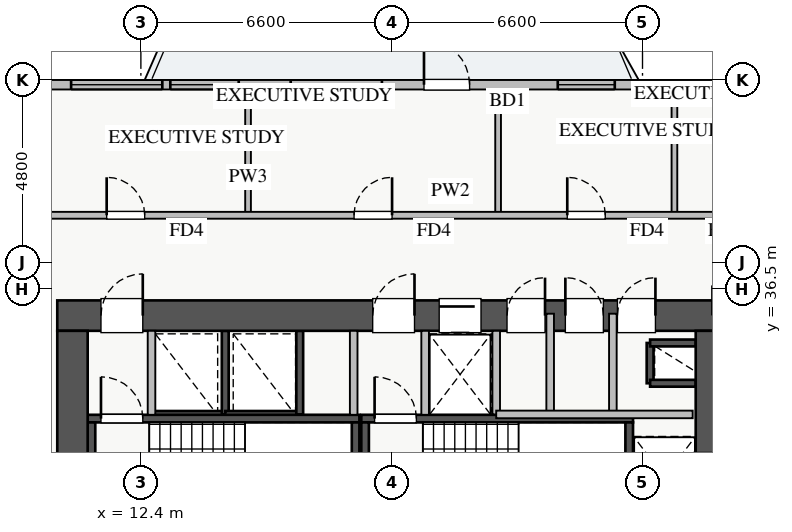
"""IFC4 building model, lengths in metres.
Left out: names, types, materials, properties, quantities, classifications, styles, units other than length and angle.
Written with IfcOpenShell. Run it as: python <this file> out.ifc"""

import sys

from ifc_helpers import new_model, si_unit, direction, frame, frame_2d, origin, place, context, subcontext, project, spatial, rectangle, extrude, source, transform, mapped, element, fill, save


model = new_model("IFC4")
c1 = context("Model", 3, precision=1e-05, world=origin(), true_north=direction((0.0, 1.0)))
c2 = subcontext(c1, "Body", "Model", "MODEL_VIEW")
j1 = project(units=[si_unit("LENGTHUNIT", "METRE"), si_unit("PLANEANGLEUNIT", "RADIAN")], contexts=[c1])
p1 = place(None, origin())
s1 = spatial("IfcSite", under=j1, at=p1, CompositionType="ELEMENT")
p2 = place(p1, origin())
s2 = spatial("IfcBuilding", under=s1, at=p2, CompositionType="ELEMENT")
p3 = place(p2, frame((0.0, 0.0, 69.75)))
s3 = spatial("IfcBuildingStorey", under=s2, at=p3, CompositionType="ELEMENT", Elevation=69.75)
p4 = place(p3, frame((12.68, 33.2, 0.0), z_axis=(0.0, 0.0, 1.0), x_axis=(1.0, 0.0, 0.0)))
e1 = element("IfcWall", 1, at=p4, inside=s3, PredefinedType="SHEAR", context=c2, shape_type="SweptSolid", body=[
    extrude(rectangle(XDim=1.94, YDim=0.18, at=frame_2d((0.97, 0.0))), origin(), (0.0, 0.0, 1.0), 3.07),
])
p5 = place(p3, frame((14.62, 33.2, 0.0), z_axis=(0.0, 0.0, 1.0), x_axis=(0.0, 1.0, 0.0)))
e2 = element("IfcWall", 2, at=p5, inside=s3, PredefinedType="SHEAR", context=c2, shape_type="SweptSolid", body=[
    extrude(rectangle(XDim=2.2, YDim=0.18, at=frame_2d((1.1, 0.0))), origin(), (0.0, 0.0, 1.0), 3.07),
])
p6 = place(p3, frame((25.8, 34.02, 0.0), z_axis=(0.0, 0.0, 1.0), x_axis=(0.0, 1.0, 0.0)))
e3 = element("IfcWall", 3, at=p6, inside=s3, PredefinedType="SHEAR", context=c2, shape_type="SweptSolid", body=[
    extrude(rectangle(XDim=1.06, YDim=0.18, at=frame_2d((0.53, 0.0))), origin(), (0.0, 0.0, 1.0), 3.07),
])
for number, where, z_axis, x_axis in (
    (4, (25.8, 35.08, 0.0), (0.0, 0.0, 1.0), (1.0, 0.0, 0.0)),
    (5, (25.8, 34.02, 0.0), (0.0, 0.0, 1.0), (1.0, 0.0, 0.0)),
):
    element("IfcWall", number, at=place(p3, frame(where, z_axis=z_axis, x_axis=x_axis)), inside=s3, PredefinedType="SHEAR", context=c2, shape_type="SweptSolid", body=[
        extrude(rectangle(XDim=1.2, YDim=0.18, at=frame_2d((0.6, 0.0))), origin(), (0.0, 0.0, 1.0), 3.07),
    ])
p7 = place(p3, frame((14.62, 33.2, 0.0), z_axis=(0.0, 0.0, 1.0), x_axis=(1.0, 0.0, 0.0)))
e6 = element("IfcWall", 6, at=p7, inside=s3, PredefinedType="SHEAR", context=c2, shape_type="SweptSolid", body=[
    extrude(rectangle(XDim=1.96, YDim=0.18, at=frame_2d((0.98, 0.0))), origin(), (0.0, 0.0, 1.0), 3.07),
])
p8 = place(p3, frame((16.58, 33.2, 0.0), z_axis=(0.0, 0.0, 1.0), x_axis=(0.0, 1.0, 0.0)))
e7 = element("IfcWall", 7, at=p8, inside=s3, PredefinedType="SHEAR", context=c2, shape_type="SweptSolid", body=[
    extrude(rectangle(XDim=2.2, YDim=0.18, at=frame_2d((1.1, 0.0))), origin(), (0.0, 0.0, 1.0), 3.07),
])
p9 = place(p3, frame((19.88, 33.2, 0.0), z_axis=(0.0, 0.0, 1.0), x_axis=(1.0, 0.0, 0.0)))
e8 = element("IfcWall", 8, at=p9, inside=s3, PredefinedType="SHEAR", context=c2, shape_type="SweptSolid", body=[
    extrude(rectangle(XDim=1.87, YDim=0.18, at=frame_2d((0.935, 0.0))), origin(), (0.0, 0.0, 1.0), 3.07),
])
p10 = place(p3, frame((11.0, 33.09, 0.0), z_axis=(0.0, 0.0, 1.0), x_axis=(1.0, 0.0, 0.0)))
e9 = element("IfcWall", 9, at=p10, inside=s3, PredefinedType="SHEAR", context=c2, shape_type="SweptSolid", body=[
    extrude(rectangle(XDim=7.15, YDim=0.2, at=frame_2d((3.575, 0.0))), origin(), (0.0, 0.0, 1.0), 3.25),
])
p11 = place(p10, frame((0.35, 0.0, 0.0)))
e10 = element("IfcOpeningElement", 10, at=p11, cuts=e9, PredefinedType="OPENING", context=c2, shape_type="SweptSolid", body=[
    extrude(rectangle(XDim=1.1, YDim=2.05, at=frame_2d((0.55, 1.025))), frame((0.0, 0.11, 0.0), z_axis=(0.0, -1.0, 0.0), x_axis=(1.0, 0.0, 0.0)), (0.0, 0.0, 1.0), 0.22),
])
for number, where, z_axis, x_axis in (
    (11, (11.1, 30.05, 0.0), (0.0, 0.0, 1.0), (0.0, 1.0, 0.0)),
    (12, (18.05, 30.05, 0.0), (0.0, 0.0, 1.0), (0.0, 1.0, 0.0)),
):
    element("IfcWall", number, at=place(p3, frame(where, z_axis=z_axis, x_axis=x_axis)), inside=s3, PredefinedType="SHEAR", context=c2, shape_type="SweptSolid", body=[
        extrude(rectangle(XDim=2.94, YDim=0.2, at=frame_2d((1.47, 0.0))), origin(), (0.0, 0.0, 1.0), 3.25),
    ])
p12 = place(p3, frame((18.2, 33.09, 0.0), z_axis=(0.0, 0.0, 1.0), x_axis=(1.0, 0.0, 0.0)))
e13 = element("IfcWall", 13, at=p12, inside=s3, PredefinedType="SHEAR", context=c2, shape_type="SweptSolid", body=[
    extrude(rectangle(XDim=7.15, YDim=0.2, at=frame_2d((3.575, 0.0))), origin(), (0.0, 0.0, 1.0), 3.25),
])
p13 = place(p12, frame((0.35, 0.0, 0.0)))
e14 = element("IfcOpeningElement", 14, at=p13, cuts=e13, PredefinedType="OPENING", context=c2, shape_type="SweptSolid", body=[
    extrude(rectangle(XDim=1.1, YDim=2.05, at=frame_2d((0.55, 1.025))), frame((0.0, 0.11, 0.0), z_axis=(0.0, -1.0, 0.0), x_axis=(1.0, 0.0, 0.0)), (0.0, 0.0, 1.0), 0.22),
])
for number, where, z_axis, x_axis in (
    (15, (18.3, 30.05, 0.0), (0.0, 0.0, 1.0), (0.0, 1.0, 0.0)),
    (16, (25.25, 30.05, 0.0), (0.0, 0.0, 1.0), (0.0, 1.0, 0.0)),
):
    element("IfcWall", number, at=place(p3, frame(where, z_axis=z_axis, x_axis=x_axis)), inside=s3, PredefinedType="SHEAR", context=c2, shape_type="SweptSolid", body=[
        extrude(rectangle(XDim=2.94, YDim=0.2, at=frame_2d((1.47, 0.0))), origin(), (0.0, 0.0, 1.0), 3.25),
    ])
p14 = place(p3, frame((10.2, 35.8, 0.0), z_axis=(0.0, 0.0, 1.0), x_axis=(1.0, 0.0, 0.0)))
e17 = element("IfcWall", 17, at=p14, inside=s3, PredefinedType="SHEAR", context=c2, shape_type="SweptSolid", body=[
    extrude(rectangle(XDim=17.6, YDim=0.8, at=frame_2d((8.8, 0.0))), origin(), (0.0, 0.0, 1.0), 3.25),
])
p15 = place(p14, frame((1.15, 0.0, 0.0)))
e18 = element("IfcOpeningElement", 18, at=p15, cuts=e17, PredefinedType="OPENING", context=c2, shape_type="SweptSolid", body=[
    extrude(rectangle(XDim=1.1, YDim=2.05, at=frame_2d((0.55, 1.025))), frame((0.0, 0.41, 0.0), z_axis=(0.0, -1.0, 0.0), x_axis=(1.0, 0.0, 0.0)), (0.0, 0.0, 1.0), 0.82),
])
p16 = place(p14, frame((8.3, 0.0, 0.0)))
e19 = element("IfcOpeningElement", 19, at=p16, cuts=e17, PredefinedType="OPENING", context=c2, shape_type="SweptSolid", body=[
    extrude(rectangle(XDim=1.1, YDim=2.05, at=frame_2d((0.55, 1.025))), frame((0.0, 0.41, 0.0), z_axis=(0.0, -1.0, 0.0), x_axis=(1.0, 0.0, 0.0)), (0.0, 0.0, 1.0), 0.82),
])
p17 = place(p14, frame((10.05, 0.0, 0.0)))
e20 = element("IfcOpeningElement", 20, at=p17, cuts=e17, PredefinedType="OPENING", context=c2, shape_type="SweptSolid", body=[
    extrude(rectangle(XDim=1.1, YDim=2.05, at=frame_2d((0.55, 1.025))), frame((0.0, 0.41, 0.0), z_axis=(0.0, -1.0, 0.0), x_axis=(1.0, 0.0, 0.0)), (0.0, 0.0, 1.0), 0.82),
])
p18 = place(p14, frame((14.74, 0.0, 0.0)))
e21 = element("IfcOpeningElement", 21, at=p18, cuts=e17, PredefinedType="OPENING", context=c2, shape_type="SweptSolid", body=[
    extrude(rectangle(XDim=1.0, YDim=2.05, at=frame_2d((0.5, 1.025))), frame((0.0, 0.41, 0.0), z_axis=(0.0, -1.0, 0.0), x_axis=(1.0, 0.0, 0.0)), (0.0, 0.0, 1.0), 0.82),
])
p19 = place(p14, frame((11.835, 0.0, 0.0)))
e22 = element("IfcOpeningElement", 22, at=p19, cuts=e17, PredefinedType="OPENING", context=c2, shape_type="SweptSolid", body=[
    extrude(rectangle(XDim=1.0, YDim=2.05, at=frame_2d((0.5, 1.025))), frame((0.0, 0.41, 0.0), z_axis=(0.0, -1.0, 0.0), x_axis=(1.0, 0.0, 0.0)), (0.0, 0.0, 1.0), 0.82),
])
p20 = place(p14, frame((13.37, 0.0, 0.0)))
e23 = element("IfcOpeningElement", 23, at=p20, cuts=e17, PredefinedType="OPENING", context=c2, shape_type="SweptSolid", body=[
    extrude(rectangle(XDim=1.0, YDim=2.05, at=frame_2d((0.5, 1.025))), frame((0.0, 0.41, 0.0), z_axis=(0.0, -1.0, 0.0), x_axis=(1.0, 0.0, 0.0)), (0.0, 0.0, 1.0), 0.82),
])
p21 = place(p3, frame((10.6, 29.8, 0.0), z_axis=(0.0, 0.0, 1.0), x_axis=(0.0, 1.0, 0.0)))
e24 = element("IfcWall", 24, at=p21, inside=s3, PredefinedType="SHEAR", context=c2, shape_type="SweptSolid", body=[
    extrude(rectangle(XDim=5.6, YDim=0.8, at=frame_2d((2.8, 0.0))), origin(), (0.0, 0.0, 1.0), 3.25),
])
p22 = place(p3, frame((27.4, 29.8, 0.0), z_axis=(0.0, 0.0, 1.0), x_axis=(0.0, 1.0, 0.0)))
e25 = element("IfcWall", 25, at=p22, inside=s3, PredefinedType="SHEAR", context=c2, shape_type="SweptSolid", body=[
    extrude(rectangle(XDim=5.6, YDim=0.8, at=frame_2d((2.8, 0.0))), origin(), (0.0, 0.0, 1.0), 3.25),
])
p23 = place(p22, frame((1.1, 0.0, 0.0)))
e26 = element("IfcOpeningElement", 26, at=p23, cuts=e25, PredefinedType="OPENING", context=c2, shape_type="SweptSolid", body=[
    extrude(rectangle(XDim=1.3, YDim=2.05, at=frame_2d((0.65, 1.025))), frame((0.0, 0.41, 0.0), z_axis=(0.0, -1.0, 0.0), x_axis=(1.0, 0.0, 0.0)), (0.0, 0.0, 1.0), 0.82),
])
p24 = place(p3, frame((5.45, 41.875, 0.0), z_axis=(0.0, 0.0, 1.0), x_axis=(1.0, 0.0, 0.0)))
e27 = element("IfcWall", 27, at=p24, inside=s3, PredefinedType="STANDARD", context=c2, shape_type="SweptSolid", body=[
    extrude(rectangle(XDim=27.1, YDim=0.25, at=frame_2d((13.55, 0.0))), origin(), (0.0, 0.0, 1.0), 2.61),
])
p25 = place(p24, frame((14.4, 0.0, 0.0)))
e28 = element("IfcOpeningElement", 28, at=p25, cuts=e27, PredefinedType="OPENING", context=c2, shape_type="SweptSolid", body=[
    extrude(rectangle(XDim=1.2, YDim=2.1, at=frame_2d((0.6, 1.05))), frame((0.0, 0.135, 0.0), z_axis=(0.0, -1.0, 0.0), x_axis=(1.0, 0.0, 0.0)), (0.0, 0.0, 1.0), 0.27),
])
p26 = place(p24, frame((1.48, 0.0, 0.9)))
e29 = element("IfcOpeningElement", 29, at=p26, cuts=e27, PredefinedType="OPENING", context=c2, shape_type="SweptSolid", body=[
    extrude(rectangle(XDim=1.5, YDim=1.5, at=frame_2d((0.75, 0.75))), frame((0.0, 0.135, 0.0), z_axis=(0.0, -1.0, 0.0), x_axis=(1.0, 0.0, 0.0)), (0.0, 0.0, 1.0), 0.27),
])
p27 = place(p24, frame((7.725, 0.0, 0.9)))
e30 = element("IfcOpeningElement", 30, at=p27, cuts=e27, PredefinedType="OPENING", context=c2, shape_type="SweptSolid", body=[
    extrude(rectangle(XDim=1.8, YDim=1.5, at=frame_2d((0.9, 0.75))), frame((0.0, 0.135, 0.0), z_axis=(0.0, -1.0, 0.0), x_axis=(1.0, 0.0, 0.0)), (0.0, 0.0, 1.0), 0.27),
])
p28 = place(p24, frame((17.92, 0.0, 0.9)))
e31 = element("IfcOpeningElement", 31, at=p28, cuts=e27, PredefinedType="OPENING", context=c2, shape_type="SweptSolid", body=[
    extrude(rectangle(XDim=1.5, YDim=1.5, at=frame_2d((0.75, 0.75))), frame((0.0, 0.135, 0.0), z_axis=(0.0, -1.0, 0.0), x_axis=(1.0, 0.0, 0.0)), (0.0, 0.0, 1.0), 0.27),
])
p29 = place(p24, frame((22.663, 0.0, 0.9)))
e32 = element("IfcOpeningElement", 32, at=p29, cuts=e27, PredefinedType="OPENING", context=c2, shape_type="SweptSolid", body=[
    extrude(rectangle(XDim=2.1, YDim=1.48, at=frame_2d((1.05, 0.74))), frame((0.0, 0.135, 0.0), z_axis=(0.0, -1.0, 0.0), x_axis=(1.0, 0.0, 0.0)), (0.0, 0.0, 1.0), 0.27),
])
p30 = place(p24, frame((5.114, 0.0, 0.9)))
e33 = element("IfcOpeningElement", 33, at=p30, cuts=e27, PredefinedType="OPENING", context=c2, shape_type="SweptSolid", body=[
    extrude(rectangle(XDim=2.4, YDim=1.5, at=frame_2d((1.2, 0.75))), frame((0.0, 0.135, 0.0), z_axis=(0.0, -1.0, 0.0), x_axis=(1.0, 0.0, 0.0)), (0.0, 0.0, 1.0), 0.27),
])
p31 = place(p24, frame((10.893, 0.0, 0.9)))
e34 = element("IfcOpeningElement", 34, at=p31, cuts=e27, PredefinedType="OPENING", context=c2, shape_type="SweptSolid", body=[
    extrude(rectangle(XDim=2.4, YDim=1.5, at=frame_2d((1.2, 0.75))), frame((0.0, 0.135, 0.0), z_axis=(0.0, -1.0, 0.0), x_axis=(1.0, 0.0, 0.0)), (0.0, 0.0, 1.0), 0.27),
])
for number, where, z_axis, x_axis in (
    (35, (12.68, 33.19, 0.0), (0.0, 0.0, 1.0), (0.0, 1.0, 0.0)),
    (36, (18.0, 33.19, 0.0), (0.0, 0.0, 1.0), (0.0, 1.0, 0.0)),
    (37, (19.88, 33.19, 0.0), (0.0, 0.0, 1.0), (0.0, 1.0, 0.0)),
):
    element("IfcWall", number, at=place(p3, frame(where, z_axis=z_axis, x_axis=x_axis)), inside=s3, PredefinedType="PARTITIONING", context=c2, shape_type="SweptSolid", body=[
        extrude(rectangle(XDim=2.21, YDim=0.2, at=frame_2d((1.105, 0.0))), origin(), (0.0, 0.0, 1.0), 3.07),
    ])
p32 = place(p3, frame((24.82, 33.2, 0.0), z_axis=(0.0, 0.0, 1.0), x_axis=(0.0, 1.0, 0.0)))
e38 = element("IfcWall", 38, at=p32, inside=s3, PredefinedType="PARTITIONING", context=c2, shape_type="SweptSolid", body=[
    extrude(rectangle(XDim=2.65, YDim=0.2, at=frame_2d((1.325, 0.0))), origin(), (0.0, 0.0, 1.0), 3.07),
])
p33 = place(p3, frame((21.75, 33.2, 0.0), z_axis=(0.0, 0.0, 1.0), x_axis=(0.0, 1.0, 0.0)))
e39 = element("IfcWall", 39, at=p33, inside=s3, PredefinedType="PARTITIONING", context=c2, shape_type="SweptSolid", body=[
    extrude(rectangle(XDim=2.2, YDim=0.2, at=frame_2d((1.1, 0.0))), origin(), (0.0, 0.0, 1.0), 3.07),
])
p34 = place(p3, frame((23.17, 33.2, 0.0), z_axis=(0.0, 0.0, 1.0), x_axis=(0.0, 1.0, 0.0)))
e40 = element("IfcWall", 40, at=p34, inside=s3, PredefinedType="PARTITIONING", context=c2, shape_type="SweptSolid", body=[
    extrude(rectangle(XDim=2.65, YDim=0.2, at=frame_2d((1.325, 0.0))), origin(), (0.0, 0.0, 1.0), 3.07),
])
p35 = place(p3, frame((21.75, 33.2, 0.0), z_axis=(0.0, 0.0, 1.0), x_axis=(1.0, 0.0, 0.0)))
e41 = element("IfcWall", 41, at=p35, inside=s3, PredefinedType="PARTITIONING", context=c2, shape_type="SweptSolid", body=[
    extrude(rectangle(XDim=5.17, YDim=0.2, at=frame_2d((2.585, 0.0))), origin(), (0.0, 0.0, 1.0), 3.07),
])
for number, where, z_axis, x_axis in (
    (42, (15.22, 38.44, 0.0), (0.0, 0.0, 1.0), (0.0, 1.0, 0.0)),
    (43, (21.8, 38.44, 0.0), (0.0, 0.0, 1.0), (0.0, 1.0, 0.0)),
    (44, (26.44, 38.44, 0.0), (0.0, 0.0, 1.0), (0.0, 1.0, 0.0)),
):
    element("IfcWall", number, at=place(p3, frame(where, z_axis=z_axis, x_axis=x_axis)), inside=s3, PredefinedType="PARTITIONING", context=c2, shape_type="SweptSolid", body=[
        extrude(rectangle(XDim=3.31, YDim=0.15, at=frame_2d((1.655, 0.0))), origin(), (0.0, 0.0, 1.0), 3.07),
    ])
p36 = place(p3, frame((8.78, 38.44, 0.0), z_axis=(0.0, 0.0, 1.0), x_axis=(1.0, 0.0, 0.0)))
e45 = element("IfcWall", 45, at=p36, inside=s3, PredefinedType="PARTITIONING", context=c2, shape_type="SweptSolid", body=[
    extrude(rectangle(XDim=23.54, YDim=0.18, at=frame_2d((11.77, 0.0))), origin(), (0.0, 0.0, 1.0), 3.07),
])
p37 = place(p36, frame((2.72, 0.0, 0.0)))
e46 = element("IfcOpeningElement", 46, at=p37, cuts=e45, PredefinedType="OPENING", context=c2, shape_type="SweptSolid", body=[
    extrude(rectangle(XDim=1.0, YDim=2.05, at=frame_2d((0.5, 1.025))), frame((0.0, 0.1, 0.0), z_axis=(0.0, -1.0, 0.0), x_axis=(1.0, 0.0, 0.0)), (0.0, 0.0, 1.0), 0.2),
])
p38 = place(p36, frame((9.23, 0.0, 0.0)))
e47 = element("IfcOpeningElement", 47, at=p38, cuts=e45, PredefinedType="OPENING", context=c2, shape_type="SweptSolid", body=[
    extrude(rectangle(XDim=1.0, YDim=2.05, at=frame_2d((0.5, 1.025))), frame((0.0, 0.1, 0.0), z_axis=(0.0, -1.0, 0.0), x_axis=(1.0, 0.0, 0.0)), (0.0, 0.0, 1.0), 0.2),
])
p39 = place(p36, frame((14.84, 0.0, 0.0)))
e48 = element("IfcOpeningElement", 48, at=p39, cuts=e45, PredefinedType="OPENING", context=c2, shape_type="SweptSolid", body=[
    extrude(rectangle(XDim=1.0, YDim=2.05, at=frame_2d((0.5, 1.025))), frame((0.0, 0.1, 0.0), z_axis=(0.0, -1.0, 0.0), x_axis=(1.0, 0.0, 0.0)), (0.0, 0.0, 1.0), 0.2),
])
p40 = place(p36, frame((20.1, 0.0, 0.0)))
e49 = element("IfcOpeningElement", 49, at=p40, cuts=e45, PredefinedType="OPENING", context=c2, shape_type="SweptSolid", body=[
    extrude(rectangle(XDim=1.0, YDim=2.05, at=frame_2d((0.5, 1.025))), frame((0.0, 0.1, 0.0), z_axis=(0.0, -1.0, 0.0), x_axis=(1.0, 0.0, 0.0)), (0.0, 0.0, 1.0), 0.2),
])
m1 = source(origin(), c2, "Body", "SweptSolid", [
    extrude(rectangle(XDim=1.2, YDim=2.1, at=frame_2d((0.6, 1.05))), frame((0.0, 0.025, 0.0), z_axis=(0.0, -1.0, 0.0), x_axis=(1.0, 0.0, 0.0)), (0.0, 0.0, 1.0), 0.05),
])
p41 = place(p25, origin())
e50 = element("IfcDoor", 50, at=p41, inside=s3, OperationType="SINGLE_SWING_LEFT", PredefinedType="DOOR", context=c2, shape_type="MappedRepresentation", body=[
    mapped(m1, transform((0.0, 0.0, 0.0), x_axis=(1.0, 0.0, 0.0), y_axis=(0.0, 1.0, 0.0), z_axis=(0.0, 0.0, 1.0), scale=1.0)),
])
fill(e28, e50)
m2 = source(origin(), c2, "Body", "SweptSolid", [
    extrude(rectangle(XDim=1.8, YDim=1.5, at=frame_2d((0.9, 0.75))), frame((0.0, 0.03, 0.0), z_axis=(0.0, -1.0, 0.0), x_axis=(1.0, 0.0, 0.0)), (0.0, 0.0, 1.0), 0.06),
])
p42 = place(p27, origin())
e51 = element("IfcWindow", 51, at=p42, inside=s3, PartitioningType="DOUBLE_PANEL_VERTICAL", PredefinedType="WINDOW", context=c2, shape_type="MappedRepresentation", body=[
    mapped(m2, transform((0.0, 0.0, 0.0), x_axis=(1.0, 0.0, 0.0), y_axis=(0.0, 1.0, 0.0), z_axis=(0.0, 0.0, 1.0), scale=1.0)),
])
fill(e30, e51)
m3 = source(origin(), c2, "Body", "SweptSolid", [
    extrude(rectangle(XDim=1.5, YDim=1.5, at=frame_2d((0.75, 0.75))), frame((0.0, 0.03, 0.0), z_axis=(0.0, -1.0, 0.0), x_axis=(1.0, 0.0, 0.0)), (0.0, 0.0, 1.0), 0.06),
])
p43 = place(p28, origin())
e52 = element("IfcWindow", 52, at=p43, inside=s3, PartitioningType="DOUBLE_PANEL_VERTICAL", PredefinedType="WINDOW", context=c2, shape_type="MappedRepresentation", body=[
    mapped(m3, transform((0.0, 0.0, 0.0), x_axis=(1.0, 0.0, 0.0), y_axis=(0.0, 1.0, 0.0), z_axis=(0.0, 0.0, 1.0), scale=1.0)),
])
fill(e31, e52)
m4 = source(origin(), c2, "Body", "SweptSolid", [
    extrude(rectangle(XDim=1.3, YDim=2.05, at=frame_2d((0.65, 1.025))), frame((0.0, 0.025, 0.0), z_axis=(0.0, -1.0, 0.0), x_axis=(1.0, 0.0, 0.0)), (0.0, 0.0, 1.0), 0.05),
])
p44 = place(p23, origin())
e53 = element("IfcDoor", 53, at=p44, inside=s3, OperationType="SLIDING_TO_LEFT", PredefinedType="DOOR", context=c2, shape_type="MappedRepresentation", body=[
    mapped(m4, transform((0.0, 0.0, 0.0), x_axis=(1.0, 0.0, 0.0), y_axis=(0.0, 1.0, 0.0), z_axis=(0.0, 0.0, 1.0), scale=1.0)),
])
fill(e26, e53)
m5 = source(origin(), c2, "Body", "SweptSolid", [
    extrude(rectangle(XDim=1.1, YDim=2.05, at=frame_2d((0.55, 1.025))), frame((0.0, 0.025, 0.0), z_axis=(0.0, -1.0, 0.0), x_axis=(1.0, 0.0, 0.0)), (0.0, 0.0, 1.0), 0.05),
])
p45 = place(p15, origin())
e54 = element("IfcDoor", 54, at=p45, inside=s3, OperationType="SINGLE_SWING_RIGHT", PredefinedType="DOOR", context=c2, shape_type="MappedRepresentation", body=[
    mapped(m5, transform((0.0, 0.0, 0.0), x_axis=(1.0, 0.0, 0.0), y_axis=(0.0, 1.0, 0.0), z_axis=(0.0, 0.0, 1.0), scale=1.0)),
])
fill(e18, e54)
p46 = place(p11, origin())
e55 = element("IfcDoor", 55, at=p46, inside=s3, OperationType="SINGLE_SWING_LEFT", PredefinedType="DOOR", context=c2, shape_type="MappedRepresentation", body=[
    mapped(m5, transform((0.0, 0.0, 0.0), x_axis=(1.0, 0.0, 0.0), y_axis=(0.0, 1.0, 0.0), z_axis=(0.0, 0.0, 1.0), scale=1.0)),
])
fill(e10, e55)
p47 = place(p16, origin())
e56 = element("IfcDoor", 56, at=p47, inside=s3, OperationType="SINGLE_SWING_RIGHT", PredefinedType="DOOR", context=c2, shape_type="MappedRepresentation", body=[
    mapped(m5, transform((0.0, 0.0, 0.0), x_axis=(1.0, 0.0, 0.0), y_axis=(0.0, 1.0, 0.0), z_axis=(0.0, 0.0, 1.0), scale=1.0)),
])
fill(e19, e56)
p48 = place(p13, origin())
e57 = element("IfcDoor", 57, at=p48, inside=s3, OperationType="SINGLE_SWING_LEFT", PredefinedType="DOOR", context=c2, shape_type="MappedRepresentation", body=[
    mapped(m5, transform((0.0, 0.0, 0.0), x_axis=(1.0, 0.0, 0.0), y_axis=(0.0, 1.0, 0.0), z_axis=(0.0, 0.0, 1.0), scale=1.0)),
])
fill(e14, e57)
p49 = place(p17, origin())
e58 = element("IfcDoor", 58, at=p49, inside=s3, OperationType="SLIDING_TO_LEFT", PredefinedType="DOOR", context=c2, shape_type="MappedRepresentation", body=[
    mapped(m5, transform((0.0, 0.0, 0.0), x_axis=(1.0, 0.0, 0.0), y_axis=(0.0, 1.0, 0.0), z_axis=(0.0, 0.0, 1.0), scale=1.0)),
])
fill(e20, e58)
m6 = source(origin(), c2, "Body", "SweptSolid", [
    extrude(rectangle(XDim=1.0, YDim=2.05, at=frame_2d((0.5, 1.025))), frame((0.0, 0.025, 0.0), z_axis=(0.0, -1.0, 0.0), x_axis=(1.0, 0.0, 0.0)), (0.0, 0.0, 1.0), 0.05),
])
p50 = place(p18, origin())
e59 = element("IfcDoor", 59, at=p50, inside=s3, OperationType="SINGLE_SWING_RIGHT", PredefinedType="DOOR", context=c2, shape_type="MappedRepresentation", body=[
    mapped(m6, transform((0.0, 0.0, 0.0), x_axis=(1.0, 0.0, 0.0), y_axis=(0.0, 1.0, 0.0), z_axis=(0.0, 0.0, 1.0), scale=1.0)),
])
fill(e21, e59)
p51 = place(p19, origin())
e60 = element("IfcDoor", 60, at=p51, inside=s3, OperationType="SINGLE_SWING_RIGHT", PredefinedType="DOOR", context=c2, shape_type="MappedRepresentation", body=[
    mapped(m6, transform((0.0, 0.0, 0.0), x_axis=(1.0, 0.0, 0.0), y_axis=(0.0, 1.0, 0.0), z_axis=(0.0, 0.0, 1.0), scale=1.0)),
])
fill(e22, e60)
p52 = place(p20, origin())
e61 = element("IfcDoor", 61, at=p52, inside=s3, OperationType="SINGLE_SWING_LEFT", PredefinedType="DOOR", context=c2, shape_type="MappedRepresentation", body=[
    mapped(m6, transform((0.0, 0.0, 0.0), x_axis=(1.0, 0.0, 0.0), y_axis=(0.0, 1.0, 0.0), z_axis=(0.0, 0.0, 1.0), scale=1.0)),
])
fill(e23, e61)
p53 = place(p37, origin())
e62 = element("IfcDoor", 62, at=p53, inside=s3, OperationType="SINGLE_SWING_LEFT", PredefinedType="DOOR", context=c2, shape_type="MappedRepresentation", body=[
    mapped(m6, transform((0.0, 0.0, 0.0), x_axis=(1.0, 0.0, 0.0), y_axis=(0.0, 1.0, 0.0), z_axis=(0.0, 0.0, 1.0), scale=1.0)),
])
fill(e46, e62)
p54 = place(p38, origin())
e63 = element("IfcDoor", 63, at=p54, inside=s3, OperationType="SINGLE_SWING_RIGHT", PredefinedType="DOOR", context=c2, shape_type="MappedRepresentation", body=[
    mapped(m6, transform((0.0, 0.0, 0.0), x_axis=(1.0, 0.0, 0.0), y_axis=(0.0, 1.0, 0.0), z_axis=(0.0, 0.0, 1.0), scale=1.0)),
])
fill(e47, e63)
p55 = place(p39, origin())
e64 = element("IfcDoor", 64, at=p55, inside=s3, OperationType="SINGLE_SWING_LEFT", PredefinedType="DOOR", context=c2, shape_type="MappedRepresentation", body=[
    mapped(m6, transform((0.0, 0.0, 0.0), x_axis=(1.0, 0.0, 0.0), y_axis=(0.0, 1.0, 0.0), z_axis=(0.0, 0.0, 1.0), scale=1.0)),
])
fill(e48, e64)
m7 = source(origin(), c2, "Body", "SweptSolid", [
    extrude(rectangle(XDim=2.4, YDim=1.5, at=frame_2d((1.2, 0.75))), frame((0.0, 0.03, 0.0), z_axis=(0.0, -1.0, 0.0), x_axis=(1.0, 0.0, 0.0)), (0.0, 0.0, 1.0), 0.06),
])
p56 = place(p30, origin())
e65 = element("IfcWindow", 65, at=p56, inside=s3, PartitioningType="TRIPLE_PANEL_VERTICAL", PredefinedType="WINDOW", context=c2, shape_type="MappedRepresentation", body=[
    mapped(m7, transform((0.0, 0.0, 0.0), x_axis=(1.0, 0.0, 0.0), y_axis=(0.0, 1.0, 0.0), z_axis=(0.0, 0.0, 1.0), scale=1.0)),
])
fill(e33, e65)
p57 = place(p31, origin())
e66 = element("IfcWindow", 66, at=p57, inside=s3, PartitioningType="TRIPLE_PANEL_VERTICAL", PredefinedType="WINDOW", context=c2, shape_type="MappedRepresentation", body=[
    mapped(m7, transform((0.0, 0.0, 0.0), x_axis=(1.0, 0.0, 0.0), y_axis=(0.0, 1.0, 0.0), z_axis=(0.0, 0.0, 1.0), scale=1.0)),
])
fill(e34, e66)
save(model, sys.argv[1])
